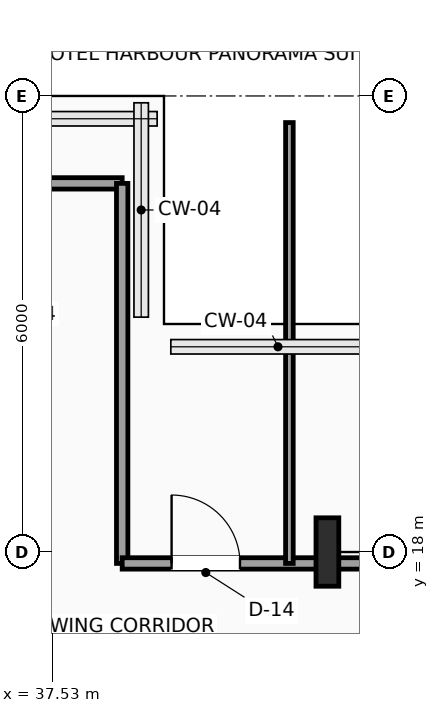
"""IFC4 building model, lengths in metres.
Left out: names, types, materials, properties, quantities, classifications, styles, units other than length and angle.
Written with IfcOpenShell. Run it as: python <this file> out.ifc"""

import sys

from ifc_helpers import new_model, si_unit, direction, frame, frame_2d, origin, origin_2d, place, context, subcontext, project, spatial, rectangle, i_section, extrude, element, fill, save


model = new_model("IFC4")
c1 = context("Model", 3, precision=1e-05, world=origin(), true_north=direction((0.0, 1.0)))
c2 = subcontext(c1, "Body", "Model", "MODEL_VIEW")
j1 = project(units=[si_unit("LENGTHUNIT", "METRE"), si_unit("PLANEANGLEUNIT", "RADIAN")], contexts=[c1])
p1 = place(None, origin())
s1 = spatial("IfcSite", under=j1, at=p1, CompositionType="ELEMENT")
p2 = place(p1, origin())
s2 = spatial("IfcBuilding", under=s1, at=p2, CompositionType="ELEMENT")
p3 = place(p2, frame((0.0, 0.0, 191.7)))
s3 = spatial("IfcBuildingStorey", under=s2, at=p3, CompositionType="ELEMENT", Elevation=191.7)
p4 = place(p3, frame((41.15, 18.0, 0.0), z_axis=(0.0, 0.0, 1.0), x_axis=(1.0, 0.0, 0.0)))
e1 = element("IfcColumn", 1, at=p4, inside=s3, PredefinedType="COLUMN", context=c2, shape_type="SweptSolid", body=[
    extrude(i_section(OverallWidth=0.3, OverallDepth=0.9, WebThickness=0.019, FlangeThickness=0.035, FilletRadius=0.03, at=origin_2d()), origin(), (0.0, 0.0, 1.0), 3.75),
])
p5 = place(p3, frame((36.35, 22.85, 0.0), z_axis=(0.0, 0.0, 1.0), x_axis=(1.0, 0.0, 0.0)))
e2 = element("IfcWall", 2, at=p5, inside=s3, PredefinedType="PARTITIONING", context=c2, shape_type="SweptSolid", body=[
    extrude(rectangle(XDim=2.1, YDim=0.15, at=frame_2d((1.05, 0.0))), origin(), (0.0, 0.0, 1.0), 3.54),
])
p6 = place(p3, frame((38.45, 22.85, 0.0), z_axis=(0.0, 0.0, 1.0), x_axis=(0.0, -1.0, 0.0)))
e3 = element("IfcWall", 3, at=p6, inside=s3, PredefinedType="PARTITIONING", context=c2, shape_type="SweptSolid", body=[
    extrude(rectangle(XDim=5.0, YDim=0.15, at=frame_2d((2.5, 0.0))), origin(), (0.0, 0.0, 1.0), 3.54),
])
p7 = place(p3, frame((38.45, 17.85, 0.0), z_axis=(0.0, 0.0, 1.0), x_axis=(1.0, 0.0, 0.0)))
e4 = element("IfcWall", 4, at=p7, inside=s3, PredefinedType="PARTITIONING", context=c2, shape_type="SweptSolid", body=[
    extrude(rectangle(XDim=3.25, YDim=0.15, at=frame_2d((1.625, 0.0))), origin(), (0.0, 0.0, 1.0), 3.132),
])
p8 = place(p7, frame((0.65, 0.0, 0.0)))
e5 = element("IfcOpeningElement", 5, at=p8, cuts=e4, PredefinedType="OPENING", context=c2, shape_type="SweptSolid", body=[
    extrude(rectangle(XDim=0.9, YDim=2.1, at=frame_2d((0.45, 1.05))), frame((0.0, 0.085, 0.0), z_axis=(0.0, -1.0, 0.0), x_axis=(1.0, 0.0, 0.0)), (0.0, 0.0, 1.0), 0.17),
])
p9 = place(p3, frame((40.65, 17.85, 0.0), z_axis=(0.0, 0.0, 1.0), x_axis=(0.0, 1.0, 0.0)))
e6 = element("IfcWall", 6, at=p9, inside=s3, PredefinedType="PARTITIONING", context=c2, shape_type="SweptSolid", body=[
    extrude(rectangle(XDim=5.8, YDim=0.1, at=frame_2d((2.9, 0.0))), origin(), (0.0, 0.0, 1.0), 3.54),
])
p10 = place(p8, origin())
e7 = element("IfcDoor", 7, at=p10, inside=s3, OperationType="SINGLE_SWING_LEFT", PredefinedType="DOOR", context=c2, shape_type="SweptSolid", body=[
    extrude(rectangle(XDim=0.9, YDim=2.1, at=frame_2d((0.45, 1.05))), frame((0.0, 0.025, 0.0), z_axis=(0.0, -1.0, 0.0), x_axis=(1.0, 0.0, 0.0)), (0.0, 0.0, 1.0), 0.05),
])
fill(e5, e7)
save(model, sys.argv[1])
